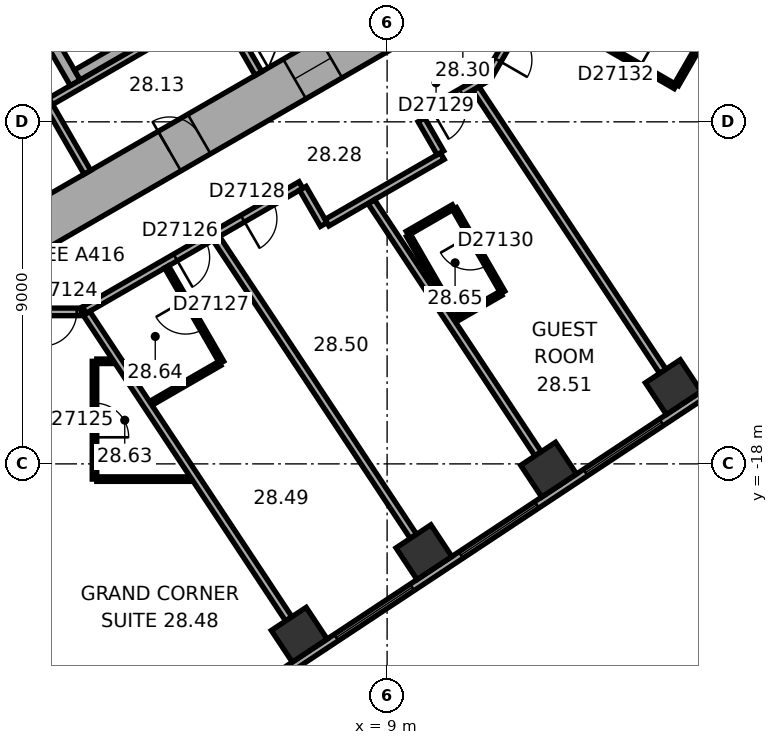
"""IFC4 building model, lengths in metres.
Left out: names, types, materials, properties, quantities, classifications, styles, units other than length and angle.
Written with IfcOpenShell. Run it as: python <this file> out.ifc"""

import sys

from ifc_helpers import new_model, si_unit, direction, frame, frame_2d, origin, origin_2d, place, context, subcontext, project, spatial, rectangle, extrude, element, fill, save


model = new_model("IFC4")
c1 = context("Model", 3, precision=1e-05, world=origin(), true_north=direction((0.0, 1.0)))
c2 = subcontext(c1, "Body", "Model", "MODEL_VIEW")
j1 = project(units=[si_unit("LENGTHUNIT", "METRE"), si_unit("PLANEANGLEUNIT", "RADIAN")], contexts=[c1])
p1 = place(None, origin())
s1 = spatial("IfcSite", under=j1, at=p1, CompositionType="ELEMENT")
p2 = place(p1, origin())
s2 = spatial("IfcBuilding", under=s1, at=p2, CompositionType="ELEMENT")
p3 = place(p2, frame((0.0, 0.0, 116.6)))
s3 = spatial("IfcBuildingStorey", under=s2, at=p3, CompositionType="ELEMENT", Elevation=116.6)
for number, where, z_axis, x_axis in (
    (1, (6.688, -22.496, 0.0), (0.0, 0.0, 1.0), (0.834, 0.552, 0.0)),
    (2, (9.969, -20.324, 0.0), (0.0, 0.0, 1.0), (0.834, 0.552, 0.0)),
    (3, (13.25, -18.152, 0.0), (0.0, 0.0, 1.0), (0.834, 0.552, 0.0)),
    (4, (16.531, -15.981, 0.0), (0.0, 0.0, 1.0), (0.834, 0.552, 0.0)),
):
    element("IfcColumn", number, at=place(p3, frame(where, z_axis=z_axis, x_axis=x_axis)), inside=s3, PredefinedType="COLUMN", context=c2, shape_type="SweptSolid", body=[
        extrude(rectangle(XDim=1.1, YDim=1.0, at=origin_2d()), origin(), (0.0, 0.0, 1.0), 3.3),
    ])
p4 = place(p3, frame((-10.4, -5.658, 0.0), z_axis=(0.0, 0.0, 1.0), x_axis=(0.866021384402, -0.500006961711, 0.0)))
e5 = element("IfcWall", 5, at=p4, inside=s3, PredefinedType="SHEAR", context=c2, shape_type="SweptSolid", body=[
    extrude(rectangle(XDim=12.355, YDim=1.2, at=frame_2d((6.178, 0.0))), origin(), (0.0, 0.0, 1.0), 3.3),
])
p5 = place(p4, frame((6.378, 0.0, 0.0)))
e6 = element("IfcOpeningElement", 6, at=p5, cuts=e5, PredefinedType="OPENING", context=c2, shape_type="SweptSolid", body=[
    extrude(rectangle(XDim=1.5, YDim=2.1, at=frame_2d((0.75, 1.05))), frame((0.0, 0.61, 0.0), z_axis=(0.0, -1.0, 0.0), x_axis=(1.0, 0.0, 0.0)), (0.0, 0.0, 1.0), 1.22),
])
p6 = place(p4, frame((3.228, 0.0, 0.0)))
e7 = element("IfcOpeningElement", 7, at=p6, cuts=e5, PredefinedType="OPENING", context=c2, shape_type="SweptSolid", body=[
    extrude(rectangle(XDim=0.9, YDim=2.1, at=frame_2d((0.45, 1.05))), frame((0.0, 0.61, 0.0), z_axis=(0.0, -1.0, 0.0), x_axis=(1.0, 0.0, 0.0)), (0.0, 0.0, 1.0), 1.22),
])
p7 = place(p3, frame((-0.3, -11.836, 0.0), z_axis=(0.0, 0.0, 1.0), x_axis=(0.866021384402, 0.500006961711, 0.0)))
e8 = element("IfcWall", 8, at=p7, inside=s3, PredefinedType="SHEAR", context=c2, shape_type="SweptSolid", body=[
    extrude(rectangle(XDim=12.355, YDim=1.2, at=frame_2d((6.178, 0.0))), origin(), (0.0, 0.0, 1.0), 3.3),
])
p8 = place(p7, frame((4.128, 0.0, 0.0)))
e9 = element("IfcOpeningElement", 9, at=p8, cuts=e8, PredefinedType="OPENING", context=c2, shape_type="SweptSolid", body=[
    extrude(rectangle(XDim=0.9, YDim=2.1, at=frame_2d((0.45, 1.05))), frame((0.0, 0.61, 0.0), z_axis=(0.0, -1.0, 0.0), x_axis=(1.0, 0.0, 0.0)), (0.0, 0.0, 1.0), 1.22),
])
p9 = place(p7, frame((7.928, 0.0, 0.0)))
e10 = element("IfcOpeningElement", 10, at=p9, cuts=e8, PredefinedType="OPENING", context=c2, shape_type="SweptSolid", body=[
    extrude(rectangle(XDim=1.1, YDim=2.1, at=frame_2d((0.55, 1.05))), frame((0.0, 0.61, 0.0), z_axis=(0.0, -1.0, 0.0), x_axis=(1.0, 0.0, 0.0)), (0.0, 0.0, 1.0), 1.22),
])
p10 = place(p3, frame((3.083, -25.601, 0.0), z_axis=(0.0, 0.0, 1.0), x_axis=(0.833884295743, 0.551939291329, 0.0)))
e11 = element("IfcWall", 11, at=p10, inside=s3, PredefinedType="STANDARD", context=c2, shape_type="SweptSolid", body=[
    extrude(rectangle(XDim=21.246, YDim=0.2, at=frame_2d((10.623, 0.0))), origin(), (0.0, 0.0, 1.0), 3.3),
])
p11 = place(p10, frame((1.553, 0.0, 0.8)))
e12 = element("IfcOpeningElement", 12, at=p11, cuts=e11, PredefinedType="OPENING", context=c2, shape_type="SweptSolid", body=[
    extrude(rectangle(XDim=2.4, YDim=1.7, at=frame_2d((1.2, 0.85))), frame((0.0, 0.11, 0.0), z_axis=(0.0, -1.0, 0.0), x_axis=(1.0, 0.0, 0.0)), (0.0, 0.0, 1.0), 0.22),
])
p12 = place(p10, frame((5.488, 0.0, 0.8)))
e13 = element("IfcOpeningElement", 13, at=p12, cuts=e11, PredefinedType="OPENING", context=c2, shape_type="SweptSolid", body=[
    extrude(rectangle(XDim=2.4, YDim=1.7, at=frame_2d((1.2, 0.85))), frame((0.0, 0.11, 0.0), z_axis=(0.0, -1.0, 0.0), x_axis=(1.0, 0.0, 0.0)), (0.0, 0.0, 1.0), 0.22),
])
p13 = place(p10, frame((9.422, 0.0, 0.8)))
e14 = element("IfcOpeningElement", 14, at=p13, cuts=e11, PredefinedType="OPENING", context=c2, shape_type="SweptSolid", body=[
    extrude(rectangle(XDim=2.4, YDim=1.7, at=frame_2d((1.2, 0.85))), frame((0.0, 0.11, 0.0), z_axis=(0.0, -1.0, 0.0), x_axis=(1.0, 0.0, 0.0)), (0.0, 0.0, 1.0), 0.22),
])
p14 = place(p10, frame((13.357, 0.0, 0.8)))
e15 = element("IfcOpeningElement", 15, at=p14, cuts=e11, PredefinedType="OPENING", context=c2, shape_type="SweptSolid", body=[
    extrude(rectangle(XDim=2.4, YDim=1.7, at=frame_2d((1.2, 0.85))), frame((0.0, 0.11, 0.0), z_axis=(0.0, -1.0, 0.0), x_axis=(1.0, 0.0, 0.0)), (0.0, 0.0, 1.0), 0.22),
])
p15 = place(p10, frame((17.291, 0.0, 0.8)))
e16 = element("IfcOpeningElement", 16, at=p15, cuts=e11, PredefinedType="OPENING", context=c2, shape_type="SweptSolid", body=[
    extrude(rectangle(XDim=2.4, YDim=1.7, at=frame_2d((1.2, 0.85))), frame((0.0, 0.11, 0.0), z_axis=(0.0, -1.0, 0.0), x_axis=(1.0, 0.0, 0.0)), (0.0, 0.0, 1.0), 0.22),
])
p16 = place(p3, frame((-0.024, -8.559, 0.0), z_axis=(0.0, 0.0, 1.0), x_axis=(0.866026010844, 0.49999894854, 0.0)))
e17 = element("IfcWall", 17, at=p16, inside=s3, PredefinedType="PARTITIONING", context=c2, shape_type="SweptSolid", body=[
    extrude(rectangle(XDim=8.0, YDim=0.2, at=frame_2d((4.0, 0.0))), origin(), (0.0, 0.0, 1.0), 2.95),
])
for number, where, z_axis, x_axis in (
    (18, (0.013, -8.422, 0.0), (0.0, 0.0, 1.0), (0.5, -0.866, 0.0)),
    (19, (4.516, -5.822, 0.0), (0.0, 0.0, 1.0), (0.5, -0.866, 0.0)),
):
    element("IfcWall", number, at=place(p3, frame(where, z_axis=z_axis, x_axis=x_axis)), inside=s3, PredefinedType="PARTITIONING", context=c2, shape_type="SweptSolid", body=[
        extrude(rectangle(XDim=2.2, YDim=0.2, at=frame_2d((1.1, 0.0))), origin(), (0.0, 0.0, 1.0), 2.95),
    ])
p17 = place(p3, frame((-1.558, -3.902, 0.0), z_axis=(0.0, 0.0, 1.0), x_axis=(0.499977259774, -0.866038532462, 0.0)))
e20 = element("IfcWall", 20, at=p17, inside=s3, PredefinedType="SHEAR", context=c2, shape_type="SweptSolid", body=[
    extrude(rectangle(XDim=4.7, YDim=0.3, at=frame_2d((2.35, 0.0))), origin(), (0.0, 0.0, 1.0), 2.95),
])
p18 = place(p17, frame((0.8, 0.0, 0.0)))
e21 = element("IfcOpeningElement", 21, at=p18, cuts=e20, PredefinedType="OPENING", context=c2, shape_type="SweptSolid", body=[
    extrude(rectangle(XDim=1.2, YDim=2.1, at=frame_2d((0.6, 1.05))), frame((0.0, 0.16, 0.0), z_axis=(0.0, -1.0, 0.0), x_axis=(1.0, 0.0, 0.0)), (0.0, 0.0, 1.0), 0.32),
])
p19 = place(p3, frame((0.847, -7.767, 0.0), z_axis=(0.0, 0.0, 1.0), x_axis=(0.866027801685, 0.499995846692, 0.0)))
e22 = element("IfcWall", 22, at=p19, inside=s3, PredefinedType="SHEAR", context=c2, shape_type="SweptSolid", body=[
    extrude(rectangle(XDim=7.06, YDim=0.3, at=frame_2d((3.53, 0.0))), origin(), (0.0, 0.0, 1.0), 2.95),
])
p20 = place(p3, frame((-0.91, -14.001, 0.0), z_axis=(0.0, 0.0, 1.0), x_axis=(1.0, 0.0, 0.0)))
e23 = element("IfcWall", 23, at=p20, inside=s3, PredefinedType="PARTITIONING", context=c2, shape_type="SweptSolid", body=[
    extrude(rectangle(XDim=1.86, YDim=0.2, at=frame_2d((0.93, 0.0))), origin(), (0.0, 0.0, 1.0), 2.95),
])
p21 = place(p20, frame((0.842, 0.0, 0.0)))
e24 = element("IfcOpeningElement", 24, at=p21, cuts=e23, PredefinedType="OPENING", context=c2, shape_type="SweptSolid", body=[
    extrude(rectangle(XDim=0.9, YDim=2.1, at=frame_2d((0.45, 1.05))), frame((0.0, 0.11, 0.0), z_axis=(0.0, -1.0, 0.0), x_axis=(1.0, 0.0, 0.0)), (0.0, 0.0, 1.0), 0.22),
])
p22 = place(p3, frame((1.033, -13.953, 0.0), z_axis=(0.0, 0.0, 1.0), x_axis=(0.866017531406, 0.500013635111, 0.0)))
e25 = element("IfcWall", 25, at=p22, inside=s3, PredefinedType="PARTITIONING", context=c2, shape_type="SweptSolid", body=[
    extrude(rectangle(XDim=6.58, YDim=0.2, at=frame_2d((3.29, 0.0))), origin(), (0.0, 0.0, 1.0), 2.95),
])
p23 = place(p22, frame((2.767, 0.0, 0.0)))
e26 = element("IfcOpeningElement", 26, at=p23, cuts=e25, PredefinedType="OPENING", context=c2, shape_type="SweptSolid", body=[
    extrude(rectangle(XDim=0.9, YDim=2.1, at=frame_2d((0.45, 1.05))), frame((0.0, 0.11, 0.0), z_axis=(0.0, -1.0, 0.0), x_axis=(1.0, 0.0, 0.0)), (0.0, 0.0, 1.0), 0.22),
])
p24 = place(p22, frame((4.811, 0.0, 0.0)))
e27 = element("IfcOpeningElement", 27, at=p24, cuts=e25, PredefinedType="OPENING", context=c2, shape_type="SweptSolid", body=[
    extrude(rectangle(XDim=0.9, YDim=2.1, at=frame_2d((0.45, 1.05))), frame((0.0, 0.11, 0.0), z_axis=(0.0, -1.0, 0.0), x_axis=(1.0, 0.0, 0.0)), (0.0, 0.0, 1.0), 0.22),
])
p25 = place(p3, frame((1.3, -18.401, 0.0), z_axis=(0.0, 0.0, 1.0), x_axis=(0.0, 1.0, 0.0)))
e28 = element("IfcWall", 28, at=p25, inside=s3, PredefinedType="PARTITIONING", context=c2, shape_type="SweptSolid", body=[
    extrude(rectangle(XDim=3.1, YDim=0.12, at=frame_2d((1.55, 0.0))), origin(), (0.0, 0.0, 1.0), 2.95),
])
p26 = place(p25, frame((1.1, 0.0, 0.0)))
e29 = element("IfcOpeningElement", 29, at=p26, cuts=e28, PredefinedType="OPENING", context=c2, shape_type="SweptSolid", body=[
    extrude(rectangle(XDim=0.9, YDim=2.1, at=frame_2d((0.45, 1.05))), frame((0.0, 0.07, 0.0), z_axis=(0.0, -1.0, 0.0), x_axis=(1.0, 0.0, 0.0)), (0.0, 0.0, 1.0), 0.14),
])
p27 = place(p3, frame((1.36, -15.301, 0.0), z_axis=(0.0, 0.0, 1.0), x_axis=(1.0, 0.0, 0.0)))
e30 = element("IfcWall", 30, at=p27, inside=s3, PredefinedType="PARTITIONING", context=c2, shape_type="SweptSolid", body=[
    extrude(rectangle(XDim=0.416, YDim=0.12, at=frame_2d((0.208, 0.0))), origin(), (0.0, 0.0, 1.0), 2.95),
])
p28 = place(p3, frame((3.198, -12.818, 0.0), z_axis=(0.0, 0.0, 1.0), x_axis=(0.499987231761, -0.866032775405, 0.0)))
e31 = element("IfcWall", 31, at=p28, inside=s3, PredefinedType="PARTITIONING", context=c2, shape_type="SweptSolid", body=[
    extrude(rectangle(XDim=2.9, YDim=0.12, at=frame_2d((1.45, 0.0))), origin(), (0.0, 0.0, 1.0), 2.95),
])
p29 = place(p28, frame((1.0, 0.0, 0.0)))
e32 = element("IfcOpeningElement", 32, at=p29, cuts=e31, PredefinedType="OPENING", context=c2, shape_type="SweptSolid", body=[
    extrude(rectangle(XDim=0.9, YDim=2.1, at=frame_2d((0.45, 1.05))), frame((0.0, 0.07, 0.0), z_axis=(0.0, -1.0, 0.0), x_axis=(1.0, 0.0, 0.0)), (0.0, 0.0, 1.0), 0.14),
])
p30 = place(p3, frame((3.828, -18.401, 0.0), z_axis=(0.0, 0.0, 1.0), x_axis=(-1.0, 0.0, 0.0)))
e33 = element("IfcWall", 33, at=p30, inside=s3, PredefinedType="PARTITIONING", context=c2, shape_type="SweptSolid", body=[
    extrude(rectangle(XDim=2.468, YDim=0.12, at=frame_2d((1.234, 0.0))), origin(), (0.0, 0.0, 1.0), 2.95),
])
p31 = place(p3, frame((4.596, -15.36, 0.0), z_axis=(0.0, 0.0, 1.0), x_axis=(-0.865986006152, -0.500068232493, 0.0)))
e34 = element("IfcWall", 34, at=p31, inside=s3, PredefinedType="PARTITIONING", context=c2, shape_type="SweptSolid", body=[
    extrude(rectangle(XDim=2.098, YDim=0.12, at=frame_2d((1.049, 0.0))), origin(), (0.0, 0.0, 1.0), 2.95),
])
p32 = place(p3, frame((6.412, -22.079, 0.0), z_axis=(0.0, 0.0, 1.0), x_axis=(-0.551919507115, 0.83389739037, 0.0)))
e35 = element("IfcWall", 35, at=p32, inside=s3, PredefinedType="PARTITIONING", context=c2, shape_type="SweptSolid", body=[
    extrude(rectangle(XDim=9.635, YDim=0.2, at=frame_2d((4.817, 0.0))), origin(), (0.0, 0.0, 1.0), 2.95),
])
p33 = place(p3, frame((6.782, -10.749, 0.0), z_axis=(0.0, 0.0, 1.0), x_axis=(0.500074377092, -0.865982457891, 0.0)))
e36 = element("IfcWall", 36, at=p33, inside=s3, PredefinedType="PARTITIONING", context=c2, shape_type="SweptSolid", body=[
    extrude(rectangle(XDim=1.101, YDim=0.2, at=frame_2d((0.55, 0.0))), origin(), (0.0, 0.0, 1.0), 2.95),
])
p34 = place(p3, frame((7.419, -11.653, 0.0), z_axis=(0.0, 0.0, 1.0), x_axis=(0.866038154057, 0.49997791523, 0.0)))
e37 = element("IfcWall", 37, at=p34, inside=s3, PredefinedType="PARTITIONING", context=c2, shape_type="SweptSolid", body=[
    extrude(rectangle(XDim=3.502, YDim=0.2, at=frame_2d((1.751, 0.0))), origin(), (0.0, 0.0, 1.0), 2.95),
])
p35 = place(p3, frame((9.532, -11.934, 0.0), z_axis=(0.0, 0.0, 1.0), x_axis=(0.866034573852, 0.49998411664, 0.0)))
e38 = element("IfcWall", 38, at=p35, inside=s3, PredefinedType="PARTITIONING", context=c2, shape_type="SweptSolid", body=[
    extrude(rectangle(XDim=1.4, YDim=0.12, at=frame_2d((0.7, 0.0))), origin(), (0.0, 0.0, 1.0), 2.95),
])
p36 = place(p3, frame((9.693, -19.907, 0.0), z_axis=(0.0, 0.0, 1.0), x_axis=(-0.551938394837, 0.833884889121, 0.0)))
e39 = element("IfcWall", 39, at=p36, inside=s3, PredefinedType="PARTITIONING", context=c2, shape_type="SweptSolid", body=[
    extrude(rectangle(XDim=9.394, YDim=0.2, at=frame_2d((4.697, 0.0))), origin(), (0.0, 0.0, 1.0), 2.15),
])
p37 = place(p3, frame((9.852, -8.861, 0.0), z_axis=(0.0, 0.0, 1.0), x_axis=(0.866013291437, 0.500020978615, 0.0)))
e40 = element("IfcWall", 40, at=p37, inside=s3, PredefinedType="PARTITIONING", context=c2, shape_type="SweptSolid", body=[
    extrude(rectangle(XDim=2.077, YDim=0.2, at=frame_2d((1.038, 0.0))), origin(), (0.0, 0.0, 1.0), 2.95),
])
p38 = place(p37, frame((0.372, 0.0, 0.0)))
e41 = element("IfcOpeningElement", 41, at=p38, cuts=e40, PredefinedType="OPENING", context=c2, shape_type="SweptSolid", body=[
    extrude(rectangle(XDim=0.9, YDim=2.1, at=frame_2d((0.45, 1.05))), frame((0.0, 0.11, 0.0), z_axis=(0.0, -1.0, 0.0), x_axis=(1.0, 0.0, 0.0)), (0.0, 0.0, 1.0), 0.22),
])
p39 = place(p3, frame((10.402, -9.815, 0.0), z_axis=(0.0, 0.0, 1.0), x_axis=(-0.499968756647, 0.866043441391, 0.0)))
e42 = element("IfcWall", 42, at=p39, inside=s3, PredefinedType="PARTITIONING", context=c2, shape_type="SweptSolid", body=[
    extrude(rectangle(XDim=1.001, YDim=0.2, at=frame_2d((0.5, 0.0))), origin(), (0.0, 0.0, 1.0), 2.95),
])
p40 = place(p3, frame((10.775, -11.286, 0.0), z_axis=(0.0, 0.0, 1.0), x_axis=(0.500046963369, -0.865998287773, 0.0)))
e43 = element("IfcWall", 43, at=p40, inside=s3, PredefinedType="PARTITIONING", context=c2, shape_type="SweptSolid", body=[
    extrude(rectangle(XDim=2.54, YDim=0.12, at=frame_2d((1.27, 0.0))), origin(), (0.0, 0.0, 1.0), 2.95),
])
p41 = place(p40, frame((0.82, 0.0, 0.0)))
e44 = element("IfcOpeningElement", 44, at=p41, cuts=e43, PredefinedType="OPENING", context=c2, shape_type="SweptSolid", body=[
    extrude(rectangle(XDim=0.9, YDim=2.1, at=frame_2d((0.45, 1.05))), frame((0.0, 0.07, 0.0), z_axis=(0.0, -1.0, 0.0), x_axis=(1.0, 0.0, 0.0)), (0.0, 0.0, 1.0), 0.14),
])
p42 = place(p3, frame((10.833, -14.185, 0.0), z_axis=(0.0, 0.0, 1.0), x_axis=(-0.500005339912, 0.866022320763, 0.0)))
e45 = element("IfcWall", 45, at=p42, inside=s3, PredefinedType="PARTITIONING", context=c2, shape_type="SweptSolid", body=[
    extrude(rectangle(XDim=2.54, YDim=0.12, at=frame_2d((1.27, 0.0))), origin(), (0.0, 0.0, 1.0), 2.95),
])
p43 = place(p3, frame((11.67, -7.788, 0.0), z_axis=(0.0, 0.0, 1.0), x_axis=(0.500063286585, 0.865988862174, 0.0)))
e46 = element("IfcWall", 46, at=p43, inside=s3, PredefinedType="PARTITIONING", context=c2, shape_type="SweptSolid", body=[
    extrude(rectangle(XDim=1.86, YDim=0.2, at=frame_2d((0.93, 0.0))), origin(), (0.0, 0.0, 1.0), 2.95),
])
p44 = place(p43, frame((0.48, 0.0, 0.0)))
e47 = element("IfcOpeningElement", 47, at=p44, cuts=e46, PredefinedType="OPENING", context=c2, shape_type="SweptSolid", body=[
    extrude(rectangle(XDim=0.9, YDim=2.1, at=frame_2d((0.45, 1.05))), frame((0.0, 0.11, 0.0), z_axis=(0.0, -1.0, 0.0), x_axis=(1.0, 0.0, 0.0)), (0.0, 0.0, 1.0), 0.22),
])
p45 = place(p3, frame((11.993, -13.515, 0.0), z_axis=(0.0, 0.0, 1.0), x_axis=(-0.865956862152, -0.500118698802, 0.0)))
e48 = element("IfcWall", 48, at=p45, inside=s3, PredefinedType="PARTITIONING", context=c2, shape_type="SweptSolid", body=[
    extrude(rectangle(XDim=1.28, YDim=0.12, at=frame_2d((0.64, 0.0))), origin(), (0.0, 0.0, 1.0), 2.95),
])
p46 = place(p3, frame((12.974, -17.735, 0.0), z_axis=(0.0, 0.0, 1.0), x_axis=(-0.55192625685, 0.833892922982, 0.0)))
e49 = element("IfcWall", 49, at=p46, inside=s3, PredefinedType="PARTITIONING", context=c2, shape_type="SweptSolid", body=[
    extrude(rectangle(XDim=7.95, YDim=0.2, at=frame_2d((3.975, 0.0))), origin(), (0.0, 0.0, 1.0), 2.95),
])
p47 = place(p3, frame((16.255, -15.564, 0.0), z_axis=(0.0, 0.0, 1.0), x_axis=(-0.55192208744, 0.833895682562, 0.0)))
e50 = element("IfcWall", 50, at=p47, inside=s3, PredefinedType="PARTITIONING", context=c2, shape_type="SweptSolid", body=[
    extrude(rectangle(XDim=8.913, YDim=0.2, at=frame_2d((4.457, 0.0))), origin(), (0.0, 0.0, 1.0), 2.15),
])
p48 = place(p3, frame((16.585, -8.074, 0.0), z_axis=(0.0, 0.0, 1.0), x_axis=(-0.86601037836, 0.500026023896, 0.0)))
e51 = element("IfcWall", 51, at=p48, inside=s3, PredefinedType="PARTITIONING", context=c2, shape_type="SweptSolid", body=[
    extrude(rectangle(XDim=3.04, YDim=0.12, at=frame_2d((1.52, 0.0))), origin(), (0.0, 0.0, 1.0), 2.95),
])
p49 = place(p48, frame((1.07, 0.0, 0.0)))
e52 = element("IfcOpeningElement", 52, at=p49, cuts=e51, PredefinedType="OPENING", context=c2, shape_type="SweptSolid", body=[
    extrude(rectangle(XDim=0.9, YDim=2.1, at=frame_2d((0.45, 1.05))), frame((0.0, 0.07, 0.0), z_axis=(0.0, -1.0, 0.0), x_axis=(1.0, 0.0, 0.0)), (0.0, 0.0, 1.0), 0.14),
])
p50 = place(p3, frame((17.906, -5.788, 0.0), z_axis=(0.0, 0.0, 1.0), x_axis=(-0.500047388771, -0.865998042136, 0.0)))
e53 = element("IfcWall", 53, at=p50, inside=s3, PredefinedType="PARTITIONING", context=c2, shape_type="SweptSolid", body=[
    extrude(rectangle(XDim=2.58, YDim=0.12, at=frame_2d((1.29, 0.0))), origin(), (0.0, 0.0, 1.0), 2.95),
])
p51 = place(p12, origin())
e54 = element("IfcWindow", 54, at=p51, inside=s3, PartitioningType="SINGLE_PANEL", PredefinedType="WINDOW", context=c2, shape_type="SweptSolid", body=[
    extrude(rectangle(XDim=2.4, YDim=1.7, at=frame_2d((1.2, 0.85))), frame((0.0, 0.03, 0.0), z_axis=(0.0, -1.0, 0.0), x_axis=(1.0, 0.0, 0.0)), (0.0, 0.0, 1.0), 0.06),
])
fill(e13, e54)
p52 = place(p13, origin())
e55 = element("IfcWindow", 55, at=p52, inside=s3, PartitioningType="SINGLE_PANEL", PredefinedType="WINDOW", context=c2, shape_type="SweptSolid", body=[
    extrude(rectangle(XDim=2.4, YDim=1.7, at=frame_2d((1.2, 0.85))), frame((0.0, 0.03, 0.0), z_axis=(0.0, -1.0, 0.0), x_axis=(1.0, 0.0, 0.0)), (0.0, 0.0, 1.0), 0.06),
])
fill(e14, e55)
p53 = place(p14, origin())
e56 = element("IfcWindow", 56, at=p53, inside=s3, PartitioningType="SINGLE_PANEL", PredefinedType="WINDOW", context=c2, shape_type="SweptSolid", body=[
    extrude(rectangle(XDim=2.4, YDim=1.7, at=frame_2d((1.2, 0.85))), frame((0.0, 0.03, 0.0), z_axis=(0.0, -1.0, 0.0), x_axis=(1.0, 0.0, 0.0)), (0.0, 0.0, 1.0), 0.06),
])
fill(e15, e56)
p54 = place(p8, origin())
e57 = element("IfcDoor", 57, at=p54, inside=s3, OperationType="SINGLE_SWING_LEFT", PredefinedType="DOOR", context=c2, shape_type="SweptSolid", body=[
    extrude(rectangle(XDim=0.9, YDim=2.1, at=frame_2d((0.45, 1.05))), frame((0.0, 0.025, 0.0), z_axis=(0.0, -1.0, 0.0), x_axis=(1.0, 0.0, 0.0)), (0.0, 0.0, 1.0), 0.05),
])
fill(e9, e57)
p55 = place(p9, origin())
e58 = element("IfcDoor", 58, at=p55, inside=s3, OperationType="DOUBLE_DOOR_SLIDING", PredefinedType="DOOR", context=c2, shape_type="SweptSolid", body=[
    extrude(rectangle(XDim=1.1, YDim=2.1, at=frame_2d((0.55, 1.05))), frame((0.0, 0.025, 0.0), z_axis=(0.0, -1.0, 0.0), x_axis=(1.0, 0.0, 0.0)), (0.0, 0.0, 1.0), 0.05),
])
fill(e10, e58)
p56 = place(p21, origin())
e59 = element("IfcDoor", 59, at=p56, inside=s3, OperationType="SINGLE_SWING_LEFT", PredefinedType="DOOR", context=c2, shape_type="SweptSolid", body=[
    extrude(rectangle(XDim=0.9, YDim=2.1, at=frame_2d((0.45, 1.05))), frame((0.0, 0.025, 0.0), z_axis=(0.0, -1.0, 0.0), x_axis=(1.0, 0.0, 0.0)), (0.0, 0.0, 1.0), 0.05),
])
fill(e24, e59)
p57 = place(p26, origin())
e60 = element("IfcDoor", 60, at=p57, inside=s3, OperationType="SINGLE_SWING_LEFT", PredefinedType="DOOR", context=c2, shape_type="SweptSolid", body=[
    extrude(rectangle(XDim=0.9, YDim=2.1, at=frame_2d((0.45, 1.05))), frame((0.0, 0.025, 0.0), z_axis=(0.0, -1.0, 0.0), x_axis=(1.0, 0.0, 0.0)), (0.0, 0.0, 1.0), 0.05),
])
fill(e29, e60)
p58 = place(p23, origin())
e61 = element("IfcDoor", 61, at=p58, inside=s3, OperationType="SINGLE_SWING_LEFT", PredefinedType="DOOR", context=c2, shape_type="SweptSolid", body=[
    extrude(rectangle(XDim=0.9, YDim=2.1, at=frame_2d((0.45, 1.05))), frame((0.0, 0.025, 0.0), z_axis=(0.0, -1.0, 0.0), x_axis=(1.0, 0.0, 0.0)), (0.0, 0.0, 1.0), 0.05),
])
fill(e26, e61)
p59 = place(p29, origin())
e62 = element("IfcDoor", 62, at=p59, inside=s3, OperationType="SINGLE_SWING_LEFT", PredefinedType="DOOR", context=c2, shape_type="SweptSolid", body=[
    extrude(rectangle(XDim=0.9, YDim=2.1, at=frame_2d((0.45, 1.05))), frame((0.0, 0.025, 0.0), z_axis=(0.0, -1.0, 0.0), x_axis=(1.0, 0.0, 0.0)), (0.0, 0.0, 1.0), 0.05),
])
fill(e32, e62)
p60 = place(p24, origin())
e63 = element("IfcDoor", 63, at=p60, inside=s3, OperationType="SINGLE_SWING_LEFT", PredefinedType="DOOR", context=c2, shape_type="SweptSolid", body=[
    extrude(rectangle(XDim=0.9, YDim=2.1, at=frame_2d((0.45, 1.05))), frame((0.0, 0.025, 0.0), z_axis=(0.0, -1.0, 0.0), x_axis=(1.0, 0.0, 0.0)), (0.0, 0.0, 1.0), 0.05),
])
fill(e27, e63)
p61 = place(p38, origin())
e64 = element("IfcDoor", 64, at=p61, inside=s3, OperationType="SINGLE_SWING_LEFT", PredefinedType="DOOR", context=c2, shape_type="SweptSolid", body=[
    extrude(rectangle(XDim=0.9, YDim=2.1, at=frame_2d((0.45, 1.05))), frame((0.0, 0.025, 0.0), z_axis=(0.0, -1.0, 0.0), x_axis=(1.0, 0.0, 0.0)), (0.0, 0.0, 1.0), 0.05),
])
fill(e41, e64)
p62 = place(p41, origin())
e65 = element("IfcDoor", 65, at=p62, inside=s3, OperationType="SINGLE_SWING_LEFT", PredefinedType="DOOR", context=c2, shape_type="SweptSolid", body=[
    extrude(rectangle(XDim=0.9, YDim=2.1, at=frame_2d((0.45, 1.05))), frame((0.0, 0.025, 0.0), z_axis=(0.0, -1.0, 0.0), x_axis=(1.0, 0.0, 0.0)), (0.0, 0.0, 1.0), 0.05),
])
fill(e44, e65)
p63 = place(p44, origin())
e66 = element("IfcDoor", 66, at=p63, inside=s3, OperationType="SINGLE_SWING_LEFT", PredefinedType="DOOR", context=c2, shape_type="SweptSolid", body=[
    extrude(rectangle(XDim=0.9, YDim=2.1, at=frame_2d((0.45, 1.05))), frame((0.0, 0.025, 0.0), z_axis=(0.0, -1.0, 0.0), x_axis=(1.0, 0.0, 0.0)), (0.0, 0.0, 1.0), 0.05),
])
fill(e47, e66)
p64 = place(p49, origin())
e67 = element("IfcDoor", 67, at=p64, inside=s3, OperationType="SINGLE_SWING_LEFT", PredefinedType="DOOR", context=c2, shape_type="SweptSolid", body=[
    extrude(rectangle(XDim=0.9, YDim=2.1, at=frame_2d((0.45, 1.05))), frame((0.0, 0.025, 0.0), z_axis=(0.0, -1.0, 0.0), x_axis=(1.0, 0.0, 0.0)), (0.0, 0.0, 1.0), 0.05),
])
fill(e52, e67)
save(model, sys.argv[1])
